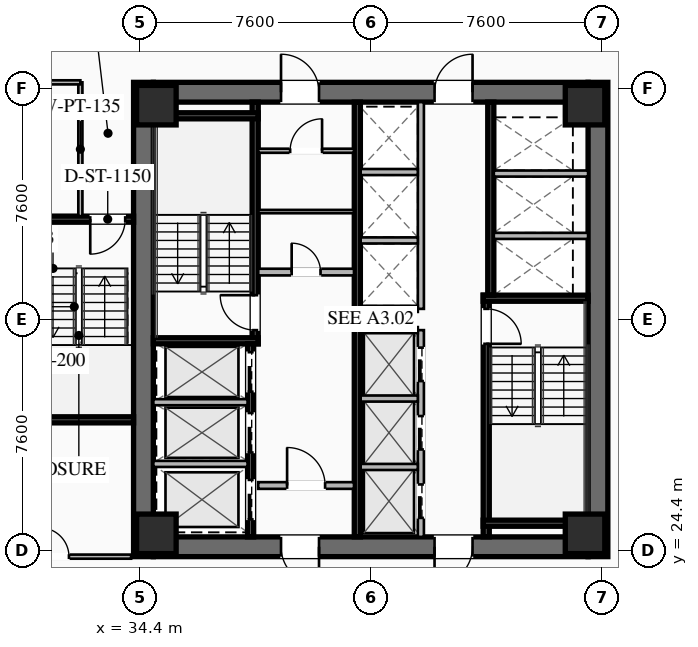
"""IFC4 building model, lengths in metres.
Left out: names, types, materials, properties, quantities, classifications, styles, units other than length and angle.
Written with IfcOpenShell. Run it as: python <this file> out.ifc"""

import sys

from ifc_helpers import new_model, si_unit, direction, frame, frame_2d, origin, origin_2d, place, context, subcontext, project, spatial, rectangle, hollow_rectangle, extrude, element, fill, save


model = new_model("IFC4")
c1 = context("Model", 3, precision=1e-05, world=origin(), true_north=direction((0.0, 1.0)))
c2 = subcontext(c1, "Body", "Model", "MODEL_VIEW")
j1 = project(units=[si_unit("LENGTHUNIT", "METRE"), si_unit("PLANEANGLEUNIT", "RADIAN")], contexts=[c1])
p1 = place(None, origin())
s1 = spatial("IfcSite", under=j1, at=p1, CompositionType="ELEMENT")
p2 = place(p1, origin())
s2 = spatial("IfcBuilding", under=s1, at=p2, CompositionType="ELEMENT")
p3 = place(p2, frame((0.0, 0.0, 56.55)))
s3 = spatial("IfcBuildingStorey", under=s2, at=p3, CompositionType="ELEMENT", Elevation=56.55)
for number, where, z_axis, x_axis in (
    (1, (34.525, 24.2, 0.0), (0.0, 0.0, 1.0), (0.0, 1.0, 0.0)),
    (2, (49.475, 39.8, 0.0), (0.0, 0.0, 1.0), (0.0, -1.0, 0.0)),
):
    element("IfcWall", number, at=place(p3, frame(where, z_axis=z_axis, x_axis=x_axis)), inside=s3, PredefinedType="SHEAR", context=c2, shape_type="SweptSolid", body=[
        extrude(rectangle(XDim=15.6, YDim=0.65, at=frame_2d((7.8, 0.0))), origin(), (0.0, 0.0, 1.0), 3.55),
    ])
p4 = place(p3, frame((49.15, 24.525, 0.0), z_axis=(0.0, 0.0, 1.0), x_axis=(-1.0, 0.0, 0.0)))
e3 = element("IfcWall", 3, at=p4, inside=s3, PredefinedType="SHEAR", context=c2, shape_type="SweptSolid", body=[
    extrude(rectangle(XDim=14.3, YDim=0.65, at=frame_2d((7.15, 0.0))), origin(), (0.0, 0.0, 1.0), 3.55),
])
p5 = place(p4, frame((8.85, 0.0, 0.0)))
e4 = element("IfcOpeningElement", 4, at=p5, cuts=e3, PredefinedType="OPENING", context=c2, shape_type="SweptSolid", body=[
    extrude(rectangle(XDim=1.25, YDim=2.25, at=frame_2d((0.625, 1.125))), frame((0.0, 0.335, 0.0), z_axis=(0.0, -1.0, 0.0), x_axis=(1.0, 0.0, 0.0)), (0.0, 0.0, 1.0), 0.67),
])
p6 = place(p4, frame((3.8, 0.0, 0.0)))
e5 = element("IfcOpeningElement", 5, at=p6, cuts=e3, PredefinedType="OPENING", context=c2, shape_type="SweptSolid", body=[
    extrude(rectangle(XDim=1.25, YDim=2.25, at=frame_2d((0.625, 1.125))), frame((0.0, 0.335, 0.0), z_axis=(0.0, -1.0, 0.0), x_axis=(1.0, 0.0, 0.0)), (0.0, 0.0, 1.0), 0.67),
])
p7 = place(p3, frame((34.85, 39.475, 0.0), z_axis=(0.0, 0.0, 1.0), x_axis=(1.0, 0.0, 0.0)))
e6 = element("IfcWall", 6, at=p7, inside=s3, PredefinedType="SHEAR", context=c2, shape_type="SweptSolid", body=[
    extrude(rectangle(XDim=14.3, YDim=0.65, at=frame_2d((7.15, 0.0))), origin(), (0.0, 0.0, 1.0), 3.55),
])
p8 = place(p7, frame((4.2, 0.0, 0.0)))
e7 = element("IfcOpeningElement", 7, at=p8, cuts=e6, PredefinedType="OPENING", context=c2, shape_type="SweptSolid", body=[
    extrude(rectangle(XDim=1.25, YDim=2.25, at=frame_2d((0.625, 1.125))), frame((0.0, 0.335, 0.0), z_axis=(0.0, -1.0, 0.0), x_axis=(1.0, 0.0, 0.0)), (0.0, 0.0, 1.0), 0.67),
])
p9 = place(p7, frame((9.25, 0.0, 0.0)))
e8 = element("IfcOpeningElement", 8, at=p9, cuts=e6, PredefinedType="OPENING", context=c2, shape_type="SweptSolid", body=[
    extrude(rectangle(XDim=1.25, YDim=2.25, at=frame_2d((0.625, 1.125))), frame((0.0, 0.335, 0.0), z_axis=(0.0, -1.0, 0.0), x_axis=(1.0, 0.0, 0.0)), (0.0, 0.0, 1.0), 0.67),
])
for number, where, z_axis, x_axis in (
    (9, (34.95, 24.95, 0.0), (0.0, 0.0, 1.0), (1.0, 0.0, 0.0)),
    (10, (49.05, 24.95, 0.0), (0.0, 0.0, 1.0), (1.0, 0.0, 0.0)),
    (11, (49.05, 39.05, 0.0), (0.0, 0.0, 1.0), (1.0, 0.0, 0.0)),
    (12, (34.95, 39.05, 0.0), (0.0, 0.0, 1.0), (1.0, 0.0, 0.0)),
):
    element("IfcColumn", number, at=place(p3, frame(where, z_axis=z_axis, x_axis=x_axis)), inside=s3, PredefinedType="COLUMN", context=c2, shape_type="SweptSolid", body=[
        extrude(hollow_rectangle(XDim=1.3, YDim=1.3, WallThickness=0.05, at=origin_2d()), origin(), (0.0, 0.0, 1.0), 3.35),
    ])
p10 = place(p3, frame((38.2, 31.2, 0.0), z_axis=(0.0, 0.0, 1.0), x_axis=(0.0, 1.0, 0.0)))
e13 = element("IfcWall", 13, at=p10, inside=s3, PredefinedType="SHEAR", context=c2, shape_type="SweptSolid", body=[
    extrude(rectangle(XDim=7.95, YDim=0.2, at=frame_2d((3.975, 0.0))), origin(), (0.0, 0.0, 1.0), 3.35),
])
p11 = place(p10, frame((0.45, 0.0, 0.0)))
e14 = element("IfcOpeningElement", 14, at=p11, cuts=e13, PredefinedType="OPENING", context=c2, shape_type="SweptSolid", body=[
    extrude(rectangle(XDim=1.15, YDim=2.2, at=frame_2d((0.575, 1.1))), frame((0.0, 0.11, 0.0), z_axis=(0.0, -1.0, 0.0), x_axis=(1.0, 0.0, 0.0)), (0.0, 0.0, 1.0), 0.22),
])
for number, where, z_axis, x_axis in (
    (15, (34.85, 31.3, 0.0), (0.0, 0.0, 1.0), (1.0, 0.0, 0.0)),
    (16, (34.85, 38.7, 0.0), (0.0, 0.0, 1.0), (1.0, 0.0, 0.0)),
):
    element("IfcWall", number, at=place(p3, frame(where, z_axis=z_axis, x_axis=x_axis)), inside=s3, PredefinedType="SHEAR", context=c2, shape_type="SweptSolid", body=[
        extrude(rectangle(XDim=3.45, YDim=0.2, at=frame_2d((1.725, 0.0))), origin(), (0.0, 0.0, 1.0), 3.35),
    ])
p12 = place(p3, frame((45.8, 32.8, 0.0), z_axis=(0.0, 0.0, 1.0), x_axis=(0.0, -1.0, 0.0)))
e17 = element("IfcWall", 17, at=p12, inside=s3, PredefinedType="SHEAR", context=c2, shape_type="SweptSolid", body=[
    extrude(rectangle(XDim=7.95, YDim=0.2, at=frame_2d((3.975, 0.0))), origin(), (0.0, 0.0, 1.0), 3.35),
])
p13 = place(p12, frame((0.45, 0.0, 0.0)))
e18 = element("IfcOpeningElement", 18, at=p13, cuts=e17, PredefinedType="OPENING", context=c2, shape_type="SweptSolid", body=[
    extrude(rectangle(XDim=1.15, YDim=2.2, at=frame_2d((0.575, 1.1))), frame((0.0, 0.11, 0.0), z_axis=(0.0, -1.0, 0.0), x_axis=(1.0, 0.0, 0.0)), (0.0, 0.0, 1.0), 0.22),
])
for number, where, z_axis, x_axis in (
    (19, (45.7, 32.7, 0.0), (0.0, 0.0, 1.0), (1.0, 0.0, 0.0)),
    (20, (45.7, 25.3, 0.0), (0.0, 0.0, 1.0), (1.0, 0.0, 0.0)),
):
    element("IfcWall", number, at=place(p3, frame(where, z_axis=z_axis, x_axis=x_axis)), inside=s3, PredefinedType="SHEAR", context=c2, shape_type="SweptSolid", body=[
        extrude(rectangle(XDim=3.45, YDim=0.2, at=frame_2d((1.725, 0.0))), origin(), (0.0, 0.0, 1.0), 3.35),
    ])
p14 = place(p3, frame((41.56, 24.85, 0.0), z_axis=(0.0, 0.0, 1.0), x_axis=(0.0, 1.0, 0.0)))
e21 = element("IfcWall", 21, at=p14, inside=s3, PredefinedType="SHEAR", context=c2, shape_type="SweptSolid", body=[
    extrude(rectangle(XDim=14.3, YDim=0.2, at=frame_2d((7.15, 0.0))), origin(), (0.0, 0.0, 1.0), 3.35),
])
p15 = place(p3, frame((38.3, 33.56, 0.0), z_axis=(0.0, 0.0, 1.0), x_axis=(1.0, 0.0, 0.0)))
e22 = element("IfcWall", 22, at=p15, inside=s3, PredefinedType="SOLIDWALL", context=c2, shape_type="SweptSolid", body=[
    extrude(rectangle(XDim=3.15, YDim=0.22, at=frame_2d((1.575, 0.0))), origin(), (0.0, 0.0, 1.0), 2.703),
])
p16 = place(p15, frame((1.1, 0.0, 0.0)))
e23 = element("IfcOpeningElement", 23, at=p16, cuts=e22, PredefinedType="OPENING", context=c2, shape_type="SweptSolid", body=[
    extrude(rectangle(XDim=0.95, YDim=2.05, at=frame_2d((0.475, 1.025))), frame((0.0, 0.12, 0.0), z_axis=(0.0, -1.0, 0.0), x_axis=(1.0, 0.0, 0.0)), (0.0, 0.0, 1.0), 0.24),
])
p17 = place(p3, frame((38.3, 26.54, 0.0), z_axis=(0.0, 0.0, 1.0), x_axis=(1.0, 0.0, 0.0)))
e24 = element("IfcWall", 24, at=p17, inside=s3, PredefinedType="SOLIDWALL", context=c2, shape_type="SweptSolid", body=[
    extrude(rectangle(XDim=3.15, YDim=0.22, at=frame_2d((1.575, 0.0))), origin(), (0.0, 0.0, 1.0), 2.703),
])
p18 = place(p17, frame((0.95, 0.0, 0.0)))
e25 = element("IfcOpeningElement", 25, at=p18, cuts=e24, PredefinedType="OPENING", context=c2, shape_type="SweptSolid", body=[
    extrude(rectangle(XDim=1.25, YDim=2.25, at=frame_2d((0.625, 1.125))), frame((0.0, 0.12, 0.0), z_axis=(0.0, -1.0, 0.0), x_axis=(1.0, 0.0, 0.0)), (0.0, 0.0, 1.0), 0.24),
])
p19 = place(p3, frame((38.05, 24.85, 0.0), z_axis=(0.0, 0.0, 1.0), x_axis=(0.0, 1.0, 0.0)))
e26 = element("IfcWall", 26, at=p19, inside=s3, PredefinedType="SHEAR", context=c2, shape_type="SweptSolid", body=[
    extrude(rectangle(XDim=6.35, YDim=0.2, at=frame_2d((3.175, 0.0))), origin(), (0.0, 0.0, 1.0), 3.35),
])
p20 = place(p19, frame((4.775, 0.0, 0.0)))
e27 = element("IfcOpeningElement", 27, at=p20, cuts=e26, PredefinedType="OPENING", context=c2, shape_type="SweptSolid", body=[
    extrude(rectangle(XDim=1.3, YDim=2.25, at=frame_2d((0.65, 1.125))), frame((0.0, 0.11, 0.0), z_axis=(0.0, -1.0, 0.0), x_axis=(1.0, 0.0, 0.0)), (0.0, 0.0, 1.0), 0.22),
])
p21 = place(p19, frame((2.775, 0.0, 0.0)))
e28 = element("IfcOpeningElement", 28, at=p21, cuts=e26, PredefinedType="OPENING", context=c2, shape_type="SweptSolid", body=[
    extrude(rectangle(XDim=1.3, YDim=2.25, at=frame_2d((0.65, 1.125))), frame((0.0, 0.11, 0.0), z_axis=(0.0, -1.0, 0.0), x_axis=(1.0, 0.0, 0.0)), (0.0, 0.0, 1.0), 0.22),
])
p22 = place(p19, frame((0.575, 0.0, 0.0)))
e29 = element("IfcOpeningElement", 29, at=p22, cuts=e26, PredefinedType="OPENING", context=c2, shape_type="SweptSolid", body=[
    extrude(rectangle(XDim=1.3, YDim=2.25, at=frame_2d((0.65, 1.125))), frame((0.0, 0.11, 0.0), z_axis=(0.0, -1.0, 0.0), x_axis=(1.0, 0.0, 0.0)), (0.0, 0.0, 1.0), 0.22),
])
for number, where, z_axis, x_axis in (
    (30, (34.85, 27.25, 0.0), (0.0, 0.0, 1.0), (1.0, 0.0, 0.0)),
    (31, (34.85, 29.28, 0.0), (0.0, 0.0, 1.0), (1.0, 0.0, 0.0)),
):
    element("IfcWall", number, at=place(p3, frame(where, z_axis=z_axis, x_axis=x_axis)), inside=s3, PredefinedType="SOLIDWALL", context=c2, shape_type="SweptSolid", body=[
        extrude(rectangle(XDim=3.1, YDim=0.2, at=frame_2d((1.55, 0.0))), origin(), (0.0, 0.0, 1.0), 3.35),
    ])
p23 = place(p3, frame((45.95, 39.15, 0.0), z_axis=(0.0, 0.0, 1.0), x_axis=(0.0, -1.0, 0.0)))
e32 = element("IfcWall", 32, at=p23, inside=s3, PredefinedType="SHEAR", context=c2, shape_type="SweptSolid", body=[
    extrude(rectangle(XDim=6.35, YDim=0.2, at=frame_2d((3.175, 0.0))), origin(), (0.0, 0.0, 1.0), 3.35),
])
for number, where, z_axis, x_axis in (
    (33, (46.05, 34.75, 0.0), (0.0, 0.0, 1.0), (1.0, 0.0, 0.0)),
    (34, (46.05, 36.8, 0.0), (0.0, 0.0, 1.0), (1.0, 0.0, 0.0)),
):
    element("IfcWall", number, at=place(p3, frame(where, z_axis=z_axis, x_axis=x_axis)), inside=s3, PredefinedType="SOLIDWALL", context=c2, shape_type="SweptSolid", body=[
        extrude(rectangle(XDim=3.1, YDim=0.2, at=frame_2d((1.55, 0.0))), origin(), (0.0, 0.0, 1.0), 3.35),
    ])
p24 = place(p3, frame((38.3, 37.55, 0.0), z_axis=(0.0, 0.0, 1.0), x_axis=(1.0, 0.0, 0.0)))
e35 = element("IfcWall", 35, at=p24, inside=s3, PredefinedType="PARTITIONING", context=c2, shape_type="SweptSolid", body=[
    extrude(rectangle(XDim=3.15, YDim=0.135, at=frame_2d((1.575, 0.0))), origin(), (0.0, 0.0, 1.0), 2.703),
])
p25 = place(p24, frame((1.05, 0.0, 0.0)))
e36 = element("IfcOpeningElement", 36, at=p25, cuts=e35, PredefinedType="OPENING", context=c2, shape_type="SweptSolid", body=[
    extrude(rectangle(XDim=1.05, YDim=2.2, at=frame_2d((0.525, 1.1))), frame((0.0, 0.077, 0.0), z_axis=(0.0, -1.0, 0.0), x_axis=(1.0, 0.0, 0.0)), (0.0, 0.0, 1.0), 0.155),
])
p26 = place(p3, frame((38.3, 35.55, 0.0), z_axis=(0.0, 0.0, 1.0), x_axis=(1.0, 0.0, 0.0)))
e37 = element("IfcWall", 37, at=p26, inside=s3, PredefinedType="PARTITIONING", context=c2, shape_type="SweptSolid", body=[
    extrude(rectangle(XDim=3.15, YDim=0.11, at=frame_2d((1.575, 0.0))), origin(), (0.0, 0.0, 1.0), 2.703),
])
p27 = place(p3, frame((43.65, 24.85, 0.0), z_axis=(0.0, 0.0, 1.0), x_axis=(0.0, 1.0, 0.0)))
e38 = element("IfcWall", 38, at=p27, inside=s3, PredefinedType="SOLIDWALL", context=c2, shape_type="SweptSolid", body=[
    extrude(rectangle(XDim=6.8, YDim=0.2, at=frame_2d((3.4, 0.0))), origin(), (0.0, 0.0, 1.0), 3.35),
])
p28 = place(p27, frame((0.625, 0.0, 0.0)))
e39 = element("IfcOpeningElement", 39, at=p28, cuts=e38, PredefinedType="OPENING", context=c2, shape_type="SweptSolid", body=[
    extrude(rectangle(XDim=1.1, YDim=2.2, at=frame_2d((0.55, 1.1))), frame((0.0, 0.11, 0.0), z_axis=(0.0, -1.0, 0.0), x_axis=(1.0, 0.0, 0.0)), (0.0, 0.0, 1.0), 0.22),
])
p29 = place(p27, frame((2.875, 0.0, 0.0)))
e40 = element("IfcOpeningElement", 40, at=p29, cuts=e38, PredefinedType="OPENING", context=c2, shape_type="SweptSolid", body=[
    extrude(rectangle(XDim=1.1, YDim=2.2, at=frame_2d((0.55, 1.1))), frame((0.0, 0.11, 0.0), z_axis=(0.0, -1.0, 0.0), x_axis=(1.0, 0.0, 0.0)), (0.0, 0.0, 1.0), 0.22),
])
p30 = place(p27, frame((5.125, 0.0, 0.0)))
e41 = element("IfcOpeningElement", 41, at=p30, cuts=e38, PredefinedType="OPENING", context=c2, shape_type="SweptSolid", body=[
    extrude(rectangle(XDim=1.1, YDim=2.2, at=frame_2d((0.55, 1.1))), frame((0.0, 0.11, 0.0), z_axis=(0.0, -1.0, 0.0), x_axis=(1.0, 0.0, 0.0)), (0.0, 0.0, 1.0), 0.22),
])
for number, where, z_axis, x_axis in (
    (42, (41.67, 27.15, 0.0), (0.0, 0.0, 1.0), (1.0, 0.0, 0.0)),
    (43, (41.67, 29.4, 0.0), (0.0, 0.0, 1.0), (1.0, 0.0, 0.0)),
    (44, (41.67, 31.65, 0.0), (0.0, 0.0, 1.0), (1.0, 0.0, 0.0)),
):
    element("IfcWall", number, at=place(p3, frame(where, z_axis=z_axis, x_axis=x_axis)), inside=s3, PredefinedType="SOLIDWALL", context=c2, shape_type="SweptSolid", body=[
        extrude(rectangle(XDim=1.88, YDim=0.2, at=frame_2d((0.94, 0.0))), origin(), (0.0, 0.0, 1.0), 3.35),
    ])
p31 = place(p3, frame((43.65, 32.35, 0.0), z_axis=(0.0, 0.0, 1.0), x_axis=(0.0, 1.0, 0.0)))
e45 = element("IfcWall", 45, at=p31, inside=s3, PredefinedType="SOLIDWALL", context=c2, shape_type="SweptSolid", body=[
    extrude(rectangle(XDim=6.8, YDim=0.2, at=frame_2d((3.4, 0.0))), origin(), (0.0, 0.0, 1.0), 3.35),
])
for number, where, z_axis, x_axis in (
    (46, (41.67, 32.35, 0.0), (0.0, 0.0, 1.0), (1.0, 0.0, 0.0)),
    (47, (41.67, 34.6, 0.0), (0.0, 0.0, 1.0), (1.0, 0.0, 0.0)),
    (48, (41.67, 36.85, 0.0), (0.0, 0.0, 1.0), (1.0, 0.0, 0.0)),
):
    element("IfcWall", number, at=place(p3, frame(where, z_axis=z_axis, x_axis=x_axis)), inside=s3, PredefinedType="SOLIDWALL", context=c2, shape_type="SweptSolid", body=[
        extrude(rectangle(XDim=1.88, YDim=0.2, at=frame_2d((0.94, 0.0))), origin(), (0.0, 0.0, 1.0), 3.35),
    ])
p32 = place(p3, frame((34.2, 35.3, 0.0), z_axis=(0.0, 0.0, 1.0), x_axis=(-1.0, 0.0, 0.0)))
e49 = element("IfcWall", 49, at=p32, inside=s3, PredefinedType="SHEAR", context=c2, shape_type="SweptSolid", body=[
    extrude(rectangle(XDim=3.4, YDim=0.2, at=frame_2d((1.7, 0.0))), origin(), (0.0, 0.0, 1.0), 3.35),
])
p33 = place(p32, frame((0.275, 0.0, 0.0)))
e50 = element("IfcOpeningElement", 50, at=p33, cuts=e49, PredefinedType="OPENING", context=c2, shape_type="SweptSolid", body=[
    extrude(rectangle(XDim=1.15, YDim=2.2, at=frame_2d((0.575, 1.1))), frame((0.0, 0.11, 0.0), z_axis=(0.0, -1.0, 0.0), x_axis=(1.0, 0.0, 0.0)), (0.0, 0.0, 1.0), 0.22),
])
p34 = place(p3, frame((30.8, 28.7, 0.0), z_axis=(0.0, 0.0, 1.0), x_axis=(1.0, 0.0, 0.0)))
e51 = element("IfcWall", 51, at=p34, inside=s3, PredefinedType="SHEAR", context=c2, shape_type="SweptSolid", body=[
    extrude(rectangle(XDim=3.4, YDim=0.2, at=frame_2d((1.7, 0.0))), origin(), (0.0, 0.0, 1.0), 3.35),
])
p35 = place(p3, frame((32.45, 35.4, 0.0), z_axis=(0.0, 0.0, 1.0), x_axis=(0.0, 1.0, 0.0)))
e52 = element("IfcWall", 52, at=p35, inside=s3, PredefinedType="PARTITIONING", context=c2, shape_type="SweptSolid", body=[
    extrude(rectangle(XDim=4.4, YDim=0.135, at=frame_2d((2.2, 0.0))), origin(), (0.0, 0.0, 1.0), 2.703),
])
p36 = place(p3, frame((32.45, 39.8, 0.0), z_axis=(0.0, 0.0, 1.0), x_axis=(-1.0, 0.0, 0.0)))
e53 = element("IfcWall", 53, at=p36, inside=s3, PredefinedType="PARTITIONING", context=c2, shape_type="SweptSolid", body=[
    extrude(rectangle(XDim=13.33, YDim=0.135, at=frame_2d((6.665, 0.0))), origin(), (0.0, 0.0, 1.0), 2.703),
])
p37 = place(p36, frame((5.84, 0.0, 0.0)))
e54 = element("IfcOpeningElement", 54, at=p37, cuts=e53, PredefinedType="OPENING", context=c2, shape_type="SweptSolid", body=[
    extrude(rectangle(XDim=0.95, YDim=2.05, at=frame_2d((0.475, 1.025))), frame((0.0, 0.077, 0.0), z_axis=(0.0, -1.0, 0.0), x_axis=(1.0, 0.0, 0.0)), (0.0, 0.0, 1.0), 0.155),
])
p38 = place(p3, frame((19.12, 24.2, 0.0), z_axis=(0.0, 0.0, 1.0), x_axis=(1.0, 0.0, 0.0)))
e55 = element("IfcWall", 55, at=p38, inside=s3, PredefinedType="PARTITIONING", context=c2, shape_type="SweptSolid", body=[
    extrude(rectangle(XDim=15.0, YDim=0.135, at=frame_2d((7.5, 0.0))), origin(), (0.0, 0.0, 1.0), 2.703),
])
p39 = place(p38, frame((12.005, 0.0, 0.0)))
e56 = element("IfcOpeningElement", 56, at=p39, cuts=e55, PredefinedType="OPENING", context=c2, shape_type="SweptSolid", body=[
    extrude(rectangle(XDim=0.95, YDim=2.05, at=frame_2d((0.475, 1.025))), frame((0.0, 0.077, 0.0), z_axis=(0.0, -1.0, 0.0), x_axis=(1.0, 0.0, 0.0)), (0.0, 0.0, 1.0), 0.155),
])
p40 = place(p8, origin())
e57 = element("IfcDoor", 57, at=p40, inside=s3, OperationType="SINGLE_SWING_LEFT", PredefinedType="DOOR", context=c2, shape_type="SweptSolid", body=[
    extrude(rectangle(XDim=1.25, YDim=2.25, at=frame_2d((0.625, 1.125))), frame((0.0, 0.025, 0.0), z_axis=(0.0, -1.0, 0.0), x_axis=(1.0, 0.0, 0.0)), (0.0, 0.0, 1.0), 0.05),
])
fill(e7, e57)
p41 = place(p9, origin())
e58 = element("IfcDoor", 58, at=p41, inside=s3, OperationType="SINGLE_SWING_RIGHT", PredefinedType="DOOR", context=c2, shape_type="SweptSolid", body=[
    extrude(rectangle(XDim=1.25, YDim=2.25, at=frame_2d((0.625, 1.125))), frame((0.0, 0.025, 0.0), z_axis=(0.0, -1.0, 0.0), x_axis=(1.0, 0.0, 0.0)), (0.0, 0.0, 1.0), 0.05),
])
fill(e8, e58)
p42 = place(p5, origin())
e59 = element("IfcDoor", 59, at=p42, inside=s3, OperationType="SINGLE_SWING_LEFT", PredefinedType="DOOR", context=c2, shape_type="SweptSolid", body=[
    extrude(rectangle(XDim=1.25, YDim=2.25, at=frame_2d((0.625, 1.125))), frame((0.0, 0.025, 0.0), z_axis=(0.0, -1.0, 0.0), x_axis=(1.0, 0.0, 0.0)), (0.0, 0.0, 1.0), 0.05),
])
fill(e4, e59)
p43 = place(p6, origin())
e60 = element("IfcDoor", 60, at=p43, inside=s3, OperationType="SINGLE_SWING_RIGHT", PredefinedType="DOOR", context=c2, shape_type="SweptSolid", body=[
    extrude(rectangle(XDim=1.25, YDim=2.25, at=frame_2d((0.625, 1.125))), frame((0.0, 0.025, 0.0), z_axis=(0.0, -1.0, 0.0), x_axis=(1.0, 0.0, 0.0)), (0.0, 0.0, 1.0), 0.05),
])
fill(e5, e60)
p44 = place(p11, origin())
e61 = element("IfcDoor", 61, at=p44, inside=s3, OperationType="SINGLE_SWING_RIGHT", PredefinedType="DOOR", context=c2, shape_type="SweptSolid", body=[
    extrude(rectangle(XDim=1.15, YDim=2.2, at=frame_2d((0.575, 1.1))), frame((0.0, 0.025, 0.0), z_axis=(0.0, -1.0, 0.0), x_axis=(1.0, 0.0, 0.0)), (0.0, 0.0, 1.0), 0.05),
])
fill(e14, e61)
p45 = place(p13, origin())
e62 = element("IfcDoor", 62, at=p45, inside=s3, OperationType="SINGLE_SWING_RIGHT", PredefinedType="DOOR", context=c2, shape_type="SweptSolid", body=[
    extrude(rectangle(XDim=1.15, YDim=2.2, at=frame_2d((0.575, 1.1))), frame((0.0, 0.025, 0.0), z_axis=(0.0, -1.0, 0.0), x_axis=(1.0, 0.0, 0.0)), (0.0, 0.0, 1.0), 0.05),
])
fill(e18, e62)
p46 = place(p18, origin())
e63 = element("IfcDoor", 63, at=p46, inside=s3, OperationType="SINGLE_SWING_LEFT", PredefinedType="DOOR", context=c2, shape_type="SweptSolid", body=[
    extrude(rectangle(XDim=1.25, YDim=2.25, at=frame_2d((0.625, 1.125))), frame((0.0, 0.025, 0.0), z_axis=(0.0, -1.0, 0.0), x_axis=(1.0, 0.0, 0.0)), (0.0, 0.0, 1.0), 0.05),
])
fill(e25, e63)
p47 = place(p25, origin())
e64 = element("IfcDoor", 64, at=p47, inside=s3, OperationType="SINGLE_SWING_RIGHT", PredefinedType="DOOR", context=c2, shape_type="SweptSolid", body=[
    extrude(rectangle(XDim=1.05, YDim=2.2, at=frame_2d((0.525, 1.1))), frame((0.0, 0.025, 0.0), z_axis=(0.0, -1.0, 0.0), x_axis=(1.0, 0.0, 0.0)), (0.0, 0.0, 1.0), 0.05),
])
fill(e36, e64)
p48 = place(p16, origin())
e65 = element("IfcDoor", 65, at=p48, inside=s3, OperationType="SINGLE_SWING_LEFT", PredefinedType="DOOR", context=c2, shape_type="SweptSolid", body=[
    extrude(rectangle(XDim=0.95, YDim=2.05, at=frame_2d((0.475, 1.025))), frame((0.0, 0.025, 0.0), z_axis=(0.0, -1.0, 0.0), x_axis=(1.0, 0.0, 0.0)), (0.0, 0.0, 1.0), 0.05),
])
fill(e23, e65)
p49 = place(p33, origin())
e66 = element("IfcDoor", 66, at=p49, inside=s3, OperationType="SINGLE_SWING_RIGHT", PredefinedType="DOOR", context=c2, shape_type="SweptSolid", body=[
    extrude(rectangle(XDim=1.15, YDim=2.2, at=frame_2d((0.575, 1.1))), frame((0.0, 0.025, 0.0), z_axis=(0.0, -1.0, 0.0), x_axis=(1.0, 0.0, 0.0)), (0.0, 0.0, 1.0), 0.05),
])
fill(e50, e66)
p50 = place(p39, origin())
e67 = element("IfcDoor", 67, at=p50, inside=s3, OperationType="SINGLE_SWING_LEFT", PredefinedType="DOOR", context=c2, shape_type="SweptSolid", body=[
    extrude(rectangle(XDim=0.95, YDim=2.05, at=frame_2d((0.475, 1.025))), frame((0.0, 0.025, 0.0), z_axis=(0.0, -1.0, 0.0), x_axis=(1.0, 0.0, 0.0)), (0.0, 0.0, 1.0), 0.05),
])
fill(e56, e67)
p51 = place(p20, origin())
e68 = element("IfcDoor", 68, at=p51, inside=s3, OperationType="SLIDING_TO_LEFT", PredefinedType="DOOR", context=c2, shape_type="SweptSolid", body=[
    extrude(rectangle(XDim=1.3, YDim=2.25, at=frame_2d((0.65, 1.125))), frame((0.0, 0.025, 0.0), z_axis=(0.0, -1.0, 0.0), x_axis=(1.0, 0.0, 0.0)), (0.0, 0.0, 1.0), 0.05),
])
fill(e27, e68)
p52 = place(p21, origin())
e69 = element("IfcDoor", 69, at=p52, inside=s3, OperationType="SLIDING_TO_LEFT", PredefinedType="DOOR", context=c2, shape_type="SweptSolid", body=[
    extrude(rectangle(XDim=1.3, YDim=2.25, at=frame_2d((0.65, 1.125))), frame((0.0, 0.025, 0.0), z_axis=(0.0, -1.0, 0.0), x_axis=(1.0, 0.0, 0.0)), (0.0, 0.0, 1.0), 0.05),
])
fill(e28, e69)
p53 = place(p22, origin())
e70 = element("IfcDoor", 70, at=p53, inside=s3, OperationType="SLIDING_TO_LEFT", PredefinedType="DOOR", context=c2, shape_type="SweptSolid", body=[
    extrude(rectangle(XDim=1.3, YDim=2.25, at=frame_2d((0.65, 1.125))), frame((0.0, 0.025, 0.0), z_axis=(0.0, -1.0, 0.0), x_axis=(1.0, 0.0, 0.0)), (0.0, 0.0, 1.0), 0.05),
])
fill(e29, e70)
p54 = place(p28, origin())
e71 = element("IfcDoor", 71, at=p54, inside=s3, OperationType="SLIDING_TO_LEFT", PredefinedType="DOOR", context=c2, shape_type="SweptSolid", body=[
    extrude(rectangle(XDim=1.1, YDim=2.2, at=frame_2d((0.55, 1.1))), frame((0.0, 0.025, 0.0), z_axis=(0.0, -1.0, 0.0), x_axis=(1.0, 0.0, 0.0)), (0.0, 0.0, 1.0), 0.05),
])
fill(e39, e71)
p55 = place(p29, origin())
e72 = element("IfcDoor", 72, at=p55, inside=s3, OperationType="SLIDING_TO_LEFT", PredefinedType="DOOR", context=c2, shape_type="SweptSolid", body=[
    extrude(rectangle(XDim=1.1, YDim=2.2, at=frame_2d((0.55, 1.1))), frame((0.0, 0.025, 0.0), z_axis=(0.0, -1.0, 0.0), x_axis=(1.0, 0.0, 0.0)), (0.0, 0.0, 1.0), 0.05),
])
fill(e40, e72)
p56 = place(p30, origin())
e73 = element("IfcDoor", 73, at=p56, inside=s3, OperationType="SLIDING_TO_LEFT", PredefinedType="DOOR", context=c2, shape_type="SweptSolid", body=[
    extrude(rectangle(XDim=1.1, YDim=2.2, at=frame_2d((0.55, 1.1))), frame((0.0, 0.025, 0.0), z_axis=(0.0, -1.0, 0.0), x_axis=(1.0, 0.0, 0.0)), (0.0, 0.0, 1.0), 0.05),
])
fill(e41, e73)
save(model, sys.argv[1])
